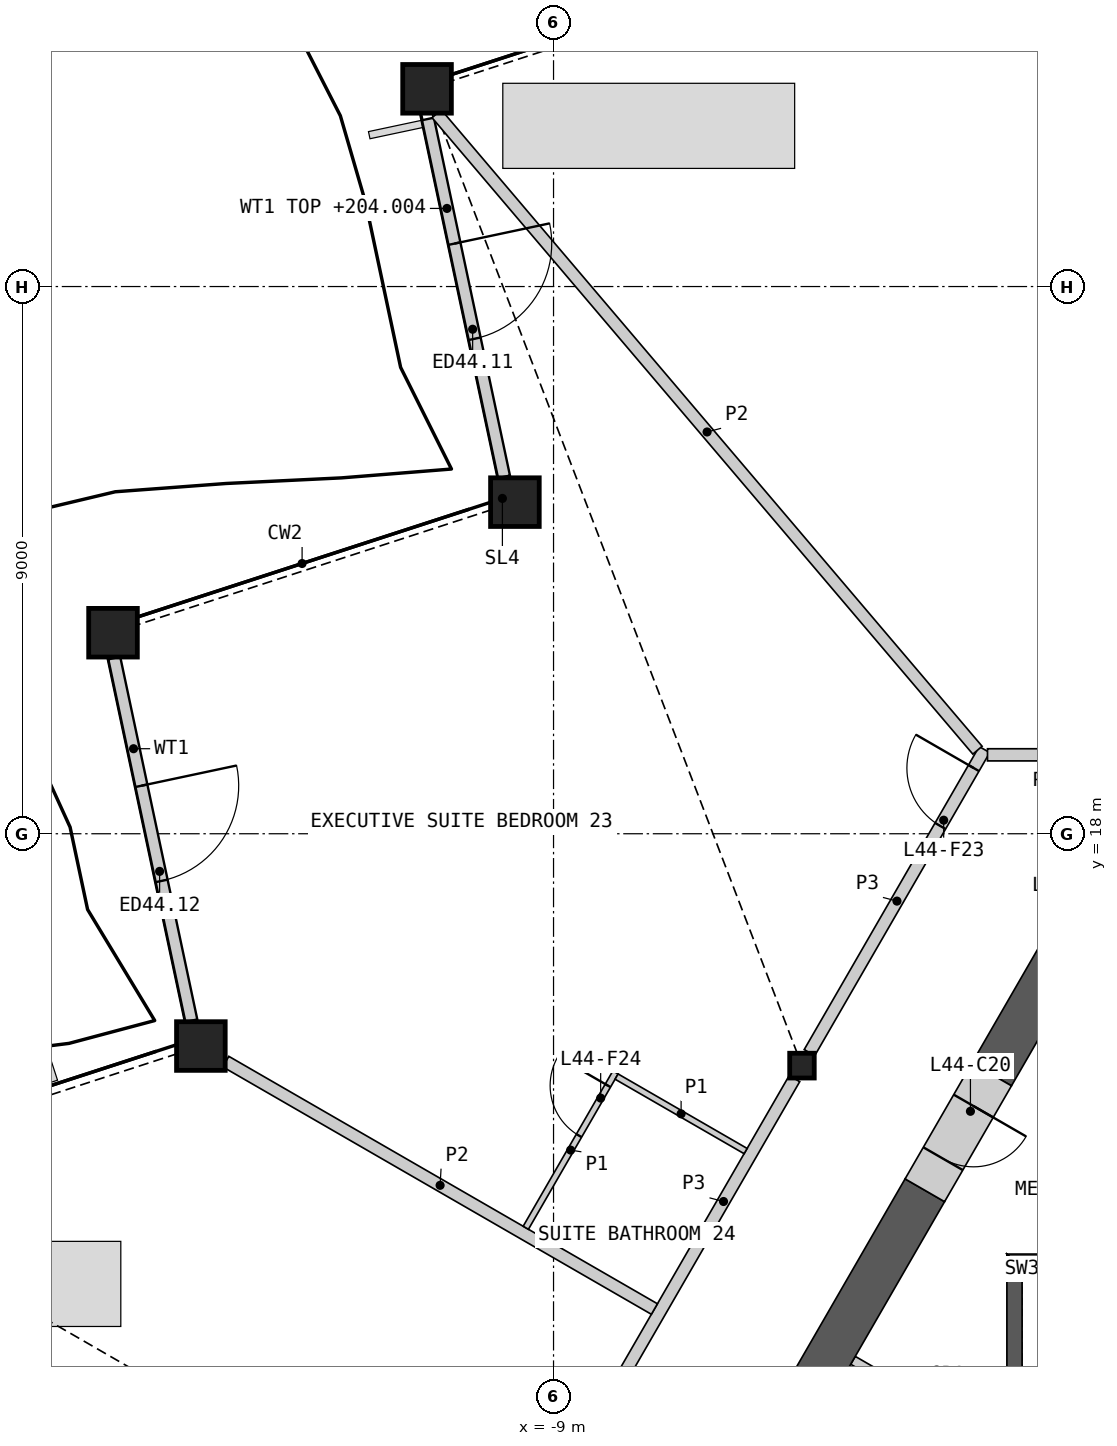
"""IFC4 building model, lengths in metres.
Left out: names, types, materials, properties, quantities, classifications, styles, units other than length and angle.
Written with IfcOpenShell. Run it as: python <this file> out.ifc"""

import sys

from ifc_helpers import new_model, si_unit, direction, frame, frame_2d, origin, origin_2d, place, context, subcontext, project, spatial, polyline, rectangle, hollow_rectangle, i_section, outline, extrude, element, fill, save


model = new_model("IFC4")
c1 = context("Model", 3, precision=1e-05, world=origin(), true_north=direction((0.0, 1.0)))
c2 = subcontext(c1, "Body", "Model", "MODEL_VIEW")
j1 = project(units=[si_unit("LENGTHUNIT", "METRE"), si_unit("PLANEANGLEUNIT", "RADIAN")], contexts=[c1])
p1 = place(None, origin())
s1 = spatial("IfcSite", under=j1, at=p1, CompositionType="ELEMENT")
p2 = place(p1, origin())
s2 = spatial("IfcBuilding", under=s1, at=p2, CompositionType="ELEMENT")
p3 = place(p2, frame((0.0, 0.0, 201.6)))
s3 = spatial("IfcBuildingStorey", under=s2, at=p3, CompositionType="ELEMENT", Elevation=201.6)
for number, where, z_axis, x_axis in (
    (1, (-11.08, 30.252, 0.0), (0.0, 0.0, 1.0), (1.0, 0.0, 0.0)),
    (2, (-9.635, 23.454, 0.0), (0.0, 0.0, 1.0), (1.0, 0.0, 0.0)),
    (3, (-16.245, 21.306, 0.0), (0.0, 0.0, 1.0), (1.0, 0.0, 0.0)),
    (4, (-14.8, 14.508, 0.0), (0.0, 0.0, 1.0), (1.0, 0.0, 0.0)),
):
    element("IfcColumn", number, at=place(p3, frame(where, z_axis=z_axis, x_axis=x_axis)), inside=s3, PredefinedType="COLUMN", context=c2, shape_type="SweptSolid", body=[
        extrude(hollow_rectangle(XDim=0.8, YDim=0.8, WallThickness=0.05, at=origin_2d()), origin(), (0.0, 0.0, 1.0), 3.6),
    ])
p4 = place(p3, frame((-4.914, 14.186, 0.0), z_axis=(0.0, 0.0, 1.0), x_axis=(1.0, 0.0, 0.0)))
e5 = element("IfcColumn", 5, at=p4, inside=s3, PredefinedType="COLUMN", context=c2, shape_type="SweptSolid", body=[
    extrude(i_section(OverallWidth=0.404, OverallDepth=0.407, WebThickness=0.027, FlangeThickness=0.044, at=origin_2d()), origin(), (0.0, 0.0, 1.0), 3.6),
])
p5 = place(p3, frame((-11.065, 29.756, 0.0), z_axis=(0.0, 0.0, 1.0), x_axis=(0.207907768613, -0.978148434416, 0.0)))
e6 = element("IfcWall", 6, at=p5, inside=s3, PredefinedType="SOLIDWALL", context=c2, shape_type="SweptSolid", body=[
    extrude(rectangle(XDim=6.017, YDim=0.2, at=frame_2d((3.009, 0.0))), origin(), (0.0, 0.0, 1.0), 2.404),
])
p6 = place(p5, frame((2.096, 0.0, 0.0)))
e7 = element("IfcOpeningElement", 7, at=p6, cuts=e6, PredefinedType="OPENING", context=c2, shape_type="SweptSolid", body=[
    extrude(rectangle(XDim=1.6, YDim=2.4, at=frame_2d((0.8, 1.2))), frame((0.0, 0.11, 0.0), z_axis=(0.0, -1.0, 0.0), x_axis=(1.0, 0.0, 0.0)), (0.0, 0.0, 1.0), 0.22),
])
p7 = place(p3, frame((-16.224, 20.89, 0.0), z_axis=(0.0, 0.0, 1.0), x_axis=(0.207912864597, -0.978147351238, 0.0)))
e8 = element("IfcWall", 8, at=p7, inside=s3, PredefinedType="SOLIDWALL", context=c2, shape_type="SweptSolid", body=[
    extrude(rectangle(XDim=6.098, YDim=0.2, at=frame_2d((3.049, 0.0))), origin(), (0.0, 0.0, 1.0), 2.701),
])
p8 = place(p7, frame((2.147, 0.0, 0.0)))
e9 = element("IfcOpeningElement", 9, at=p8, cuts=e8, PredefinedType="OPENING", context=c2, shape_type="SweptSolid", body=[
    extrude(rectangle(XDim=1.6, YDim=2.4, at=frame_2d((0.8, 1.2))), frame((0.0, 0.11, 0.0), z_axis=(0.0, -1.0, 0.0), x_axis=(1.0, 0.0, 0.0)), (0.0, 0.0, 1.0), 0.22),
])
p9 = place(p3, origin())
e10 = element("IfcWall", 10, at=p9, inside=s3, PredefinedType="SHEAR", context=c2, shape_type="SweptSolid", body=[
    extrude(outline(polyline([(1.544, 11.087), (-1.544, 11.087), (-1.294, 10.837), (1.294, 10.837), (1.544, 11.087)])), origin(), (0.0, 0.0, 1.0), 3.25),
])
p10 = place(p3, origin())
e11 = element("IfcWall", 11, at=p10, inside=s3, PredefinedType="SHEAR", context=c2, shape_type="SweptSolid", body=[
    extrude(outline(polyline([(-1.294, 10.837), (-1.544, 11.087), (-1.544, 5.237), (-1.294, 5.237), (-1.294, 10.837)])), origin(), (0.0, 0.0, 1.0), 3.25),
])
p11 = place(p3, frame((-4.075, 9.339, 0.0), z_axis=(0.0, 0.0, 1.0), x_axis=(0.865995658863, -0.500051516177, 0.0)))
e12 = element("IfcWall", 12, at=p11, inside=s3, PredefinedType="PARTITIONING", context=c2, shape_type="SweptSolid", body=[
    extrude(rectangle(XDim=2.933, YDim=0.15, at=frame_2d((1.466, 0.0))), origin(), (0.0, 0.0, 1.0), 3.25),
])
p12 = place(p3, frame((-2.894, 12.136, 0.0), z_axis=(0.0, 0.0, 1.0), x_axis=(-0.500021737671, -0.866012853171, 0.0)))
e13 = element("IfcWall", 13, at=p12, inside=s3, PredefinedType="SHEAR", context=c2, shape_type="SweptSolid", body=[
    extrude(rectangle(XDim=6.026, YDim=0.75, at=frame_2d((3.013, 0.0))), origin(), (0.0, 0.0, 1.0), 3.25),
])
p13 = place(p3, frame((-0.325, 16.585, 0.0), z_axis=(0.0, 0.0, 1.0), x_axis=(-0.500026977578, -0.866009827712, 0.0)))
e14 = element("IfcWall", 14, at=p13, inside=s3, PredefinedType="SHEAR", context=c2, shape_type="SweptSolid", body=[
    extrude(rectangle(XDim=2.938, YDim=0.75, at=frame_2d((1.469, 0.0))), origin(), (0.0, 0.0, 1.0), 3.25),
])
p14 = place(p3, frame((-1.794, 14.041, 0.0), z_axis=(0.0, 0.0, 1.0), x_axis=(-0.499946605688, -0.86605622881, 0.0)))
e15 = element("IfcWall", 15, at=p14, inside=s3, PredefinedType="SHEAR", context=c2, shape_type="SweptSolid", body=[
    extrude(rectangle(XDim=2.2, YDim=0.75, at=frame_2d((1.1, 0.0))), origin(), (0.0, 0.0, 1.0), 3.25),
])
p15 = place(p14, frame((0.6, 0.0, 0.0)))
e16 = element("IfcOpeningElement", 16, at=p15, cuts=e15, PredefinedType="OPENING", context=c2, shape_type="SweptSolid", body=[
    extrude(rectangle(XDim=1.0, YDim=2.1, at=frame_2d((0.5, 1.05))), frame((0.0, 0.385, 0.0), z_axis=(0.0, -1.0, 0.0), x_axis=(1.0, 0.0, 0.0)), (0.0, 0.0, 1.0), 0.77),
])
p16 = place(p3, frame((-9.705, 5.888, 0.0), z_axis=(0.0, 0.0, 1.0), x_axis=(0.50000393355, 0.866023132736, 0.0)))
e17 = element("IfcWall", 17, at=p16, inside=s3, PredefinedType="PARTITIONING", context=c2, shape_type="SweptSolid", body=[
    extrude(rectangle(XDim=9.335, YDim=0.2, at=frame_2d((4.667, 0.0))), origin(), (0.0, 0.0, 1.0), 3.25),
])
p17 = place(p16, frame((1.556, 0.0, 0.0)))
e18 = element("IfcOpeningElement", 18, at=p17, cuts=e17, PredefinedType="OPENING", context=c2, shape_type="SweptSolid", body=[
    extrude(rectangle(XDim=1.8, YDim=2.1, at=frame_2d((0.9, 1.05))), frame((0.0, 0.11, 0.0), z_axis=(0.0, -1.0, 0.0), x_axis=(1.0, 0.0, 0.0)), (0.0, 0.0, 1.0), 0.22),
])
p18 = place(p3, frame((-4.791, 14.4, 0.0), z_axis=(0.0, 0.0, 1.0), x_axis=(0.50000762079, 0.866021003874, 0.0)))
e19 = element("IfcWall", 19, at=p18, inside=s3, PredefinedType="PARTITIONING", context=c2, shape_type="SweptSolid", body=[
    extrude(rectangle(XDim=5.756, YDim=0.2, at=frame_2d((2.878, 0.0))), origin(), (0.0, 0.0, 1.0), 3.25),
])
p19 = place(p18, frame((4.304, 0.0, 0.0)))
e20 = element("IfcOpeningElement", 20, at=p19, cuts=e19, PredefinedType="OPENING", context=c2, shape_type="SweptSolid", body=[
    extrude(rectangle(XDim=1.1, YDim=2.1, at=frame_2d((0.55, 1.05))), frame((0.0, 0.11, 0.0), z_axis=(0.0, -1.0, 0.0), x_axis=(1.0, 0.0, 0.0)), (0.0, 0.0, 1.0), 0.22),
])
p20 = place(p3, frame((-1.863, 19.298, 0.0), z_axis=(0.0, 0.0, 1.0), x_axis=(1.0, 0.0, 0.0)))
e21 = element("IfcWall", 21, at=p20, inside=s3, PredefinedType="PARTITIONING", context=c2, shape_type="SweptSolid", body=[
    extrude(rectangle(XDim=3.726, YDim=0.2, at=frame_2d((1.863, 0.0))), origin(), (0.0, 0.0, 1.0), 3.25),
])
p21 = place(p20, frame((0.963, 0.0, 0.0)))
e22 = element("IfcOpeningElement", 22, at=p21, cuts=e21, PredefinedType="OPENING", context=c2, shape_type="SweptSolid", body=[
    extrude(rectangle(XDim=1.8, YDim=2.1, at=frame_2d((0.9, 1.05))), frame((0.0, 0.11, 0.0), z_axis=(0.0, -1.0, 0.0), x_axis=(1.0, 0.0, 0.0)), (0.0, 0.0, 1.0), 0.22),
])
p22 = place(p3, frame((-10.922, 29.842, 0.0), z_axis=(0.0, 0.0, 1.0), x_axis=(0.647497756192, -0.762067356423, 0.0)))
e23 = element("IfcWall", 23, at=p22, inside=s3, PredefinedType="PARTITIONING", context=c2, shape_type="SweptSolid", body=[
    extrude(rectangle(XDim=13.736, YDim=0.2, at=frame_2d((6.868, 0.0))), origin(), (0.0, 0.0, 1.0), 2.404),
])
p23 = place(p3, frame((-14.39, 14.252, 0.0), z_axis=(0.0, 0.0, 1.0), x_axis=(0.866028741424, -0.499994218994, 0.0)))
e24 = element("IfcWall", 24, at=p23, inside=s3, PredefinedType="PARTITIONING", context=c2, shape_type="SweptSolid", body=[
    extrude(rectangle(XDim=8.139, YDim=0.2, at=frame_2d((4.07, 0.0))), origin(), (0.0, 0.0, 1.0), 2.404),
])
p24 = place(p3, frame((-9.456, 11.519, 0.0), z_axis=(0.0, 0.0, 1.0), x_axis=(0.499939757307, 0.866060182126, 0.0)))
e25 = element("IfcWall", 25, at=p24, inside=s3, PredefinedType="PARTITIONING", context=c2, shape_type="SweptSolid", body=[
    extrude(rectangle(XDim=2.95, YDim=0.1, at=frame_2d((1.475, 0.0))), origin(), (0.0, 0.0, 1.0), 2.404),
])
p25 = place(p24, frame((1.75, 0.0, 0.0)))
e26 = element("IfcOpeningElement", 26, at=p25, cuts=e25, PredefinedType="OPENING", context=c2, shape_type="SweptSolid", body=[
    extrude(rectangle(XDim=0.95, YDim=2.1, at=frame_2d((0.475, 1.05))), frame((0.0, 0.06, 0.0), z_axis=(0.0, -1.0, 0.0), x_axis=(1.0, 0.0, 0.0)), (0.0, 0.0, 1.0), 0.12),
])
p26 = place(p3, frame((-7.963, 14.006, 0.0), z_axis=(0.0, 0.0, 1.0), x_axis=(0.866057815567, -0.499943856944, 0.0)))
e27 = element("IfcWall", 27, at=p26, inside=s3, PredefinedType="PARTITIONING", context=c2, shape_type="SweptSolid", body=[
    extrude(rectangle(XDim=2.45, YDim=0.1, at=frame_2d((1.225, 0.0))), origin(), (0.0, 0.0, 1.0), 2.404),
])
p27 = place(p6, origin())
e28 = element("IfcDoor", 28, at=p27, inside=s3, OperationType="DOUBLE_DOOR_SINGLE_SWING", PredefinedType="DOOR", context=c2, shape_type="SweptSolid", body=[
    extrude(rectangle(XDim=1.6, YDim=2.4, at=frame_2d((0.8, 1.2))), frame((0.0, 0.025, 0.0), z_axis=(0.0, -1.0, 0.0), x_axis=(1.0, 0.0, 0.0)), (0.0, 0.0, 1.0), 0.05),
])
fill(e7, e28)
p28 = place(p8, origin())
e29 = element("IfcDoor", 29, at=p28, inside=s3, OperationType="DOUBLE_DOOR_SINGLE_SWING", PredefinedType="DOOR", context=c2, shape_type="SweptSolid", body=[
    extrude(rectangle(XDim=1.6, YDim=2.4, at=frame_2d((0.8, 1.2))), frame((0.0, 0.025, 0.0), z_axis=(0.0, -1.0, 0.0), x_axis=(1.0, 0.0, 0.0)), (0.0, 0.0, 1.0), 0.05),
])
fill(e9, e29)
p29 = place(p15, origin())
e30 = element("IfcDoor", 30, at=p29, inside=s3, OperationType="SINGLE_SWING_LEFT", PredefinedType="DOOR", context=c2, shape_type="SweptSolid", body=[
    extrude(rectangle(XDim=1.0, YDim=2.1, at=frame_2d((0.5, 1.05))), frame((0.0, 0.13, 0.0), z_axis=(0.0, -1.0, 0.0), x_axis=(1.0, 0.0, 0.0)), (0.0, 0.0, 1.0), 0.05),
])
fill(e16, e30)
p30 = place(p19, origin())
e31 = element("IfcDoor", 31, at=p30, inside=s3, OperationType="SINGLE_SWING_RIGHT", PredefinedType="DOOR", context=c2, shape_type="SweptSolid", body=[
    extrude(rectangle(XDim=1.1, YDim=2.1, at=frame_2d((0.55, 1.05))), frame((0.0, 0.025, 0.0), z_axis=(0.0, -1.0, 0.0), x_axis=(1.0, 0.0, 0.0)), (0.0, 0.0, 1.0), 0.05),
])
fill(e20, e31)
p31 = place(p25, origin())
e32 = element("IfcDoor", 32, at=p31, inside=s3, OperationType="SINGLE_SWING_RIGHT", PredefinedType="DOOR", context=c2, shape_type="SweptSolid", body=[
    extrude(rectangle(XDim=0.95, YDim=2.1, at=frame_2d((0.475, 1.05))), frame((0.0, 0.025, 0.0), z_axis=(0.0, -1.0, 0.0), x_axis=(1.0, 0.0, 0.0)), (0.0, 0.0, 1.0), 0.05),
])
fill(e26, e32)
save(model, sys.argv[1])
